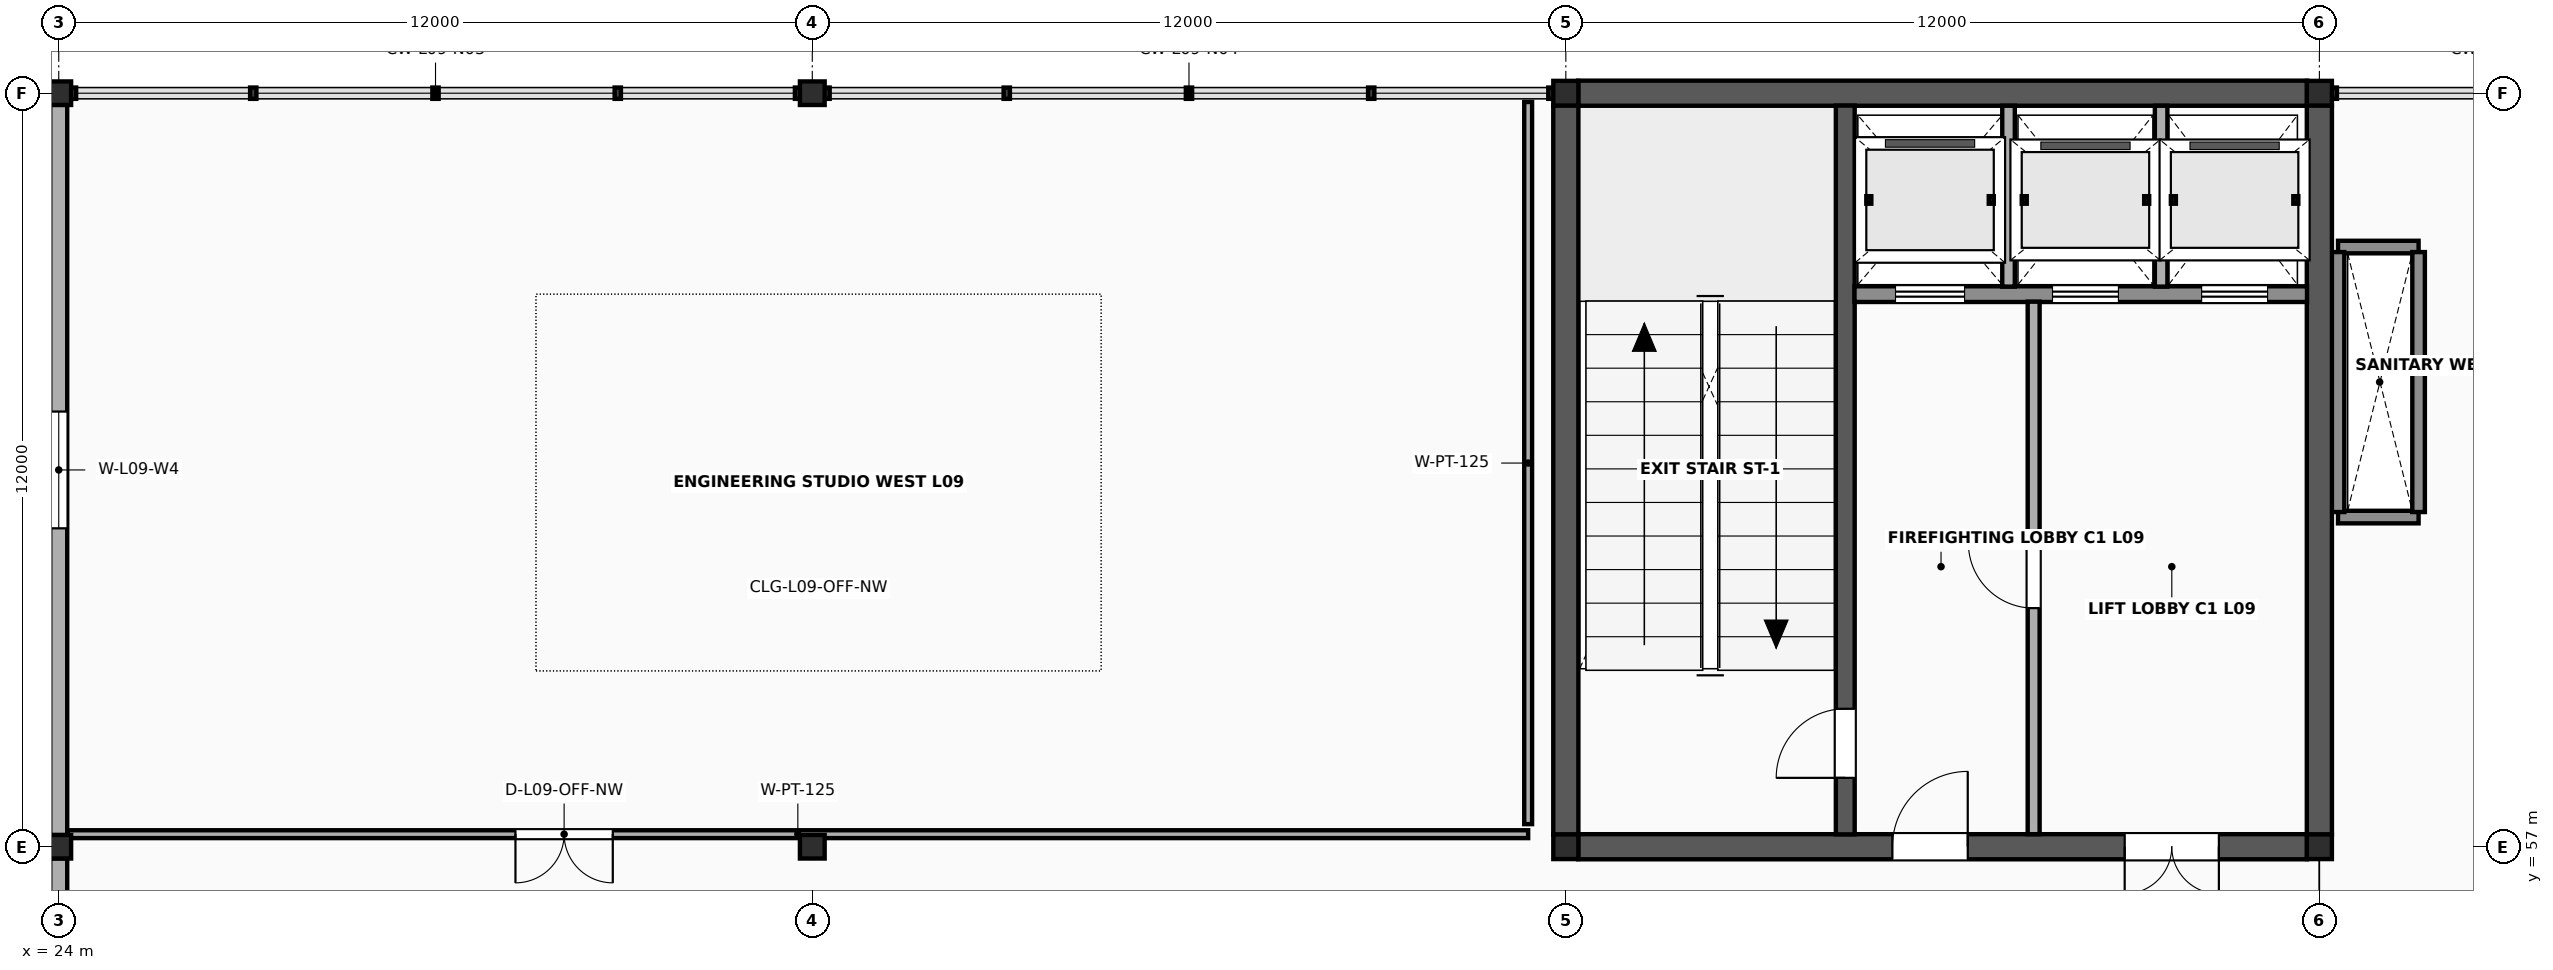
"""IFC4 building model, lengths in metres.
Left out: names, types, materials, properties, quantities, classifications, styles, units other than length and angle.
Written with IfcOpenShell. Run it as: python <this file> out.ifc"""

import sys

from ifc_helpers import new_model, si_unit, direction, frame, frame_2d, origin, origin_2d, place, context, subcontext, project, spatial, rectangle, i_section, extrude, element, fill, save


model = new_model("IFC4")
c1 = context("Model", 3, precision=1e-05, world=origin(), true_north=direction((0.0, 1.0)))
c2 = subcontext(c1, "Body", "Model", "MODEL_VIEW")
j1 = project(units=[si_unit("LENGTHUNIT", "METRE"), si_unit("PLANEANGLEUNIT", "RADIAN")], contexts=[c1])
p1 = place(None, origin())
s1 = spatial("IfcSite", under=j1, at=p1, CompositionType="ELEMENT")
p2 = place(p1, origin())
s2 = spatial("IfcBuilding", under=s1, at=p2, CompositionType="ELEMENT")
p3 = place(p2, frame((0.0, 0.0, 37.6)))
s3 = spatial("IfcBuildingStorey", under=s2, at=p3, CompositionType="ELEMENT", Elevation=37.6)
for number, where, z_axis, x_axis in (
    (1, (24.0, 57.0, 0.0), (0.0, 0.0, 1.0), (1.0, 0.0, 0.0)),
    (2, (24.0, 69.0, 0.0), (0.0, 0.0, 1.0), (1.0, 0.0, 0.0)),
    (3, (36.0, 57.0, 0.0), (0.0, 0.0, 1.0), (1.0, 0.0, 0.0)),
    (4, (36.0, 69.0, 0.0), (0.0, 0.0, 1.0), (1.0, 0.0, 0.0)),
):
    element("IfcColumn", number, at=place(p3, frame(where, z_axis=z_axis, x_axis=x_axis)), inside=s3, PredefinedType="COLUMN", context=c2, shape_type="SweptSolid", body=[
        extrude(i_section(OverallWidth=0.394, OverallDepth=0.375, WebThickness=0.017, FlangeThickness=0.028, FilletRadius=0.018, at=origin_2d()), origin(), (0.0, 0.0, 1.0), 4.0),
    ])
for number, where, z_axis, x_axis in (
    (5, (48.0, 57.0, 0.0), (0.0, 0.0, 1.0), (1.0, 0.0, 0.0)),
    (6, (48.0, 69.0, 0.0), (0.0, 0.0, 1.0), (1.0, 0.0, 0.0)),
    (7, (60.0, 57.0, 0.0), (0.0, 0.0, 1.0), (1.0, 0.0, 0.0)),
    (8, (60.0, 69.0, 0.0), (0.0, 0.0, 1.0), (1.0, 0.0, 0.0)),
):
    element("IfcColumn", number, at=place(p3, frame(where, z_axis=z_axis, x_axis=x_axis)), inside=s3, PredefinedType="COLUMN", context=c2, shape_type="SweptSolid", body=[
        extrude(i_section(OverallWidth=0.399, OverallDepth=0.393, WebThickness=0.023, FlangeThickness=0.037, FilletRadius=0.018, at=origin_2d()), origin(), (0.0, 0.0, 1.0), 4.0),
    ])
for number, where, z_axis, x_axis in (
    (9, (60.297, 62.25, 0.0), (0.0, 0.0, 1.0), (1.0, 0.0, 0.0)),
    (10, (60.297, 66.55, 0.0), (0.0, 0.0, 1.0), (1.0, 0.0, 0.0)),
):
    element("IfcWall", number, at=place(p3, frame(where, z_axis=z_axis, x_axis=x_axis)), inside=s3, PredefinedType="SOLIDWALL", context=c2, shape_type="SweptSolid", body=[
        extrude(rectangle(XDim=1.283, YDim=0.2, at=frame_2d((0.642, 0.0))), origin(), (0.0, 0.0, 1.0), 3.838),
    ])
for number, where, z_axis, x_axis in (
    (11, (60.297, 62.33, 0.0), (0.0, 0.0, 1.0), (0.0, 1.0, 0.0)),
    (12, (61.58, 62.33, 0.0), (0.0, 0.0, 1.0), (0.0, 1.0, 0.0)),
):
    element("IfcWall", number, at=place(p3, frame(where, z_axis=z_axis, x_axis=x_axis)), inside=s3, PredefinedType="SOLIDWALL", context=c2, shape_type="SweptSolid", body=[
        extrude(rectangle(XDim=4.14, YDim=0.2, at=frame_2d((2.07, 0.0))), origin(), (0.0, 0.0, 1.0), 3.838),
    ])
p4 = place(p3, frame((48.197, 57.0, 0.0), z_axis=(0.0, 0.0, 1.0), x_axis=(1.0, 0.0, 0.0)))
e13 = element("IfcWall", 13, at=p4, inside=s3, PredefinedType="SHEAR", context=c2, shape_type="SweptSolid", body=[
    extrude(rectangle(XDim=11.607, YDim=0.4, at=frame_2d((5.803, 0.0))), origin(), (0.0, 0.0, 1.0), 3.838),
])
p5 = place(p4, frame((5.004, 0.0, 0.0)))
e14 = element("IfcOpeningElement", 14, at=p5, cuts=e13, PredefinedType="OPENING", context=c2, shape_type="SweptSolid", body=[
    extrude(rectangle(XDim=1.2, YDim=2.2, at=frame_2d((0.6, 1.1))), frame((0.0, 0.215, 0.0), z_axis=(0.0, -1.0, 0.0), x_axis=(1.0, 0.0, 0.0)), (0.0, 0.0, 1.0), 0.43),
])
p6 = place(p4, frame((8.703, 0.0, 0.0)))
e15 = element("IfcOpeningElement", 15, at=p6, cuts=e13, PredefinedType="OPENING", context=c2, shape_type="SweptSolid", body=[
    extrude(rectangle(XDim=1.5, YDim=2.25, at=frame_2d((0.75, 1.125))), frame((0.0, 0.215, 0.0), z_axis=(0.0, -1.0, 0.0), x_axis=(1.0, 0.0, 0.0)), (0.0, 0.0, 1.0), 0.43),
])
p7 = place(p3, frame((48.197, 69.0, 0.0), z_axis=(0.0, 0.0, 1.0), x_axis=(1.0, 0.0, 0.0)))
e16 = element("IfcWall", 16, at=p7, inside=s3, PredefinedType="SHEAR", context=c2, shape_type="SweptSolid", body=[
    extrude(rectangle(XDim=11.607, YDim=0.4, at=frame_2d((5.803, 0.0))), origin(), (0.0, 0.0, 1.0), 3.838),
])
for number, where, z_axis, x_axis in (
    (17, (48.0, 57.194, 0.0), (0.0, 0.0, 1.0), (0.0, 1.0, 0.0)),
    (18, (60.0, 57.194, 0.0), (0.0, 0.0, 1.0), (0.0, 1.0, 0.0)),
):
    element("IfcWall", number, at=place(p3, frame(where, z_axis=z_axis, x_axis=x_axis)), inside=s3, PredefinedType="SHEAR", context=c2, shape_type="SweptSolid", body=[
        extrude(rectangle(XDim=11.613, YDim=0.4, at=frame_2d((5.806, 0.0))), origin(), (0.0, 0.0, 1.0), 3.838),
    ])
p8 = place(p3, frame((52.45, 57.197, 0.0), z_axis=(0.0, 0.0, 1.0), x_axis=(0.0, 1.0, 0.0)))
e19 = element("IfcWall", 19, at=p8, inside=s3, PredefinedType="SHEAR", context=c2, shape_type="SweptSolid", body=[
    extrude(rectangle(XDim=11.606, YDim=0.3, at=frame_2d((5.803, 0.0))), origin(), (0.0, 0.0, 1.0), 3.838),
])
p9 = place(p8, frame((0.9, 0.0, 0.0)))
e20 = element("IfcOpeningElement", 20, at=p9, cuts=e19, PredefinedType="OPENING", context=c2, shape_type="SweptSolid", body=[
    extrude(rectangle(XDim=1.1, YDim=2.2, at=frame_2d((0.55, 1.1))), frame((0.0, 0.165, 0.0), z_axis=(0.0, -1.0, 0.0), x_axis=(1.0, 0.0, 0.0)), (0.0, 0.0, 1.0), 0.33),
])
p10 = place(p3, frame((52.597, 65.8, 0.0), z_axis=(0.0, 0.0, 1.0), x_axis=(1.0, 0.0, 0.0)))
e21 = element("IfcWall", 21, at=p10, inside=s3, PredefinedType="SOLIDWALL", context=c2, shape_type="SweptSolid", body=[
    extrude(rectangle(XDim=7.206, YDim=0.25, at=frame_2d((3.603, 0.0))), origin(), (0.0, 0.0, 1.0), 3.838),
])
p11 = place(p10, frame((0.653, 0.0, 0.0)))
e22 = element("IfcOpeningElement", 22, at=p11, cuts=e21, PredefinedType="OPENING", context=c2, shape_type="SweptSolid", body=[
    extrude(rectangle(XDim=1.1, YDim=2.24, at=frame_2d((0.55, 1.12))), frame((0.0, 0.14, 0.0), z_axis=(0.0, -1.0, 0.0), x_axis=(1.0, 0.0, 0.0)), (0.0, 0.0, 1.0), 0.28),
])
p12 = place(p10, frame((3.153, 0.0, 0.0)))
e23 = element("IfcOpeningElement", 23, at=p12, cuts=e21, PredefinedType="OPENING", context=c2, shape_type="SweptSolid", body=[
    extrude(rectangle(XDim=1.05, YDim=2.2, at=frame_2d((0.525, 1.1))), frame((0.0, 0.14, 0.0), z_axis=(0.0, -1.0, 0.0), x_axis=(1.0, 0.0, 0.0)), (0.0, 0.0, 1.0), 0.28),
])
p13 = place(p10, frame((5.528, 0.0, 0.0)))
e24 = element("IfcOpeningElement", 24, at=p13, cuts=e21, PredefinedType="OPENING", context=c2, shape_type="SweptSolid", body=[
    extrude(rectangle(XDim=1.05, YDim=2.2, at=frame_2d((0.525, 1.1))), frame((0.0, 0.14, 0.0), z_axis=(0.0, -1.0, 0.0), x_axis=(1.0, 0.0, 0.0)), (0.0, 0.0, 1.0), 0.28),
])
for number, where, z_axis, x_axis in (
    (25, (55.05, 65.92, 0.0), (0.0, 0.0, 1.0), (0.0, 1.0, 0.0)),
    (26, (57.48, 65.92, 0.0), (0.0, 0.0, 1.0), (0.0, 1.0, 0.0)),
):
    element("IfcWall", number, at=place(p3, frame(where, z_axis=z_axis, x_axis=x_axis)), inside=s3, PredefinedType="SOLIDWALL", context=c2, shape_type="SweptSolid", body=[
        extrude(rectangle(XDim=2.88, YDim=0.2, at=frame_2d((1.44, 0.0))), origin(), (0.0, 0.0, 1.0), 3.828),
    ])
p14 = place(p3, frame((55.45, 57.2, 0.0), z_axis=(0.0, 0.0, 1.0), x_axis=(0.0, 1.0, 0.0)))
e27 = element("IfcWall", 27, at=p14, inside=s3, PredefinedType="SOLIDWALL", context=c2, shape_type="SweptSolid", body=[
    extrude(rectangle(XDim=8.48, YDim=0.19, at=frame_2d((4.24, 0.0))), origin(), (0.0, 0.0, 1.0), 3.828),
])
p15 = place(p14, frame((3.6, 0.0, 0.0)))
e28 = element("IfcOpeningElement", 28, at=p15, cuts=e27, PredefinedType="OPENING", context=c2, shape_type="SweptSolid", body=[
    extrude(rectangle(XDim=1.04, YDim=2.18, at=frame_2d((0.52, 1.09))), frame((0.0, 0.11, 0.0), z_axis=(0.0, -1.0, 0.0), x_axis=(1.0, 0.0, 0.0)), (0.0, 0.0, 1.0), 0.22),
])
p16 = place(p3, frame((24.0, 45.186, 0.0), z_axis=(0.0, 0.0, 1.0), x_axis=(0.0, 1.0, 0.0)))
e29 = element("IfcWall", 29, at=p16, inside=s3, PredefinedType="SOLIDWALL", context=c2, shape_type="SweptSolid", body=[
    extrude(rectangle(XDim=11.629, YDim=0.27, at=frame_2d((5.814, 0.0))), origin(), (0.0, 0.0, 1.0), 3.291),
])
p17 = place(p16, frame((4.994, 0.0, 0.78)))
e30 = element("IfcOpeningElement", 30, at=p17, cuts=e29, PredefinedType="OPENING", context=c2, shape_type="SweptSolid", body=[
    extrude(rectangle(XDim=1.64, YDim=1.74, at=frame_2d((0.82, 0.87))), frame((0.0, 0.15, 0.0), z_axis=(0.0, -1.0, 0.0), x_axis=(1.0, 0.0, 0.0)), (0.0, 0.0, 1.0), 0.3),
])
p18 = place(p3, frame((24.0, 57.186, 0.0), z_axis=(0.0, 0.0, 1.0), x_axis=(0.0, 1.0, 0.0)))
e31 = element("IfcWall", 31, at=p18, inside=s3, PredefinedType="SOLIDWALL", context=c2, shape_type="SweptSolid", body=[
    extrude(rectangle(XDim=11.629, YDim=0.27, at=frame_2d((5.814, 0.0))), origin(), (0.0, 0.0, 1.0), 3.291),
])
p19 = place(p18, frame((4.885, 0.0, 0.78)))
e32 = element("IfcOpeningElement", 32, at=p19, cuts=e31, PredefinedType="OPENING", context=c2, shape_type="SweptSolid", body=[
    extrude(rectangle(XDim=1.86, YDim=1.74, at=frame_2d((0.93, 0.87))), frame((0.0, 0.15, 0.0), z_axis=(0.0, -1.0, 0.0), x_axis=(1.0, 0.0, 0.0)), (0.0, 0.0, 1.0), 0.3),
])
p20 = place(p3, frame((24.14, 57.2, 0.0), z_axis=(0.0, 0.0, 1.0), x_axis=(1.0, 0.0, 0.0)))
e33 = element("IfcWall", 33, at=p20, inside=s3, PredefinedType="PARTITIONING", context=c2, shape_type="SweptSolid", body=[
    extrude(rectangle(XDim=23.26, YDim=0.125, at=frame_2d((11.63, 0.0))), origin(), (0.0, 0.0, 1.0), 2.88),
])
p21 = place(p20, frame((7.133, 0.0, 0.0)))
e34 = element("IfcOpeningElement", 34, at=p21, cuts=e33, PredefinedType="OPENING", context=c2, shape_type="SweptSolid", body=[
    extrude(rectangle(XDim=1.55, YDim=2.31, at=frame_2d((0.775, 1.155))), frame((0.0, 0.077, 0.0), z_axis=(0.0, -1.0, 0.0), x_axis=(1.0, 0.0, 0.0)), (0.0, 0.0, 1.0), 0.155),
])
p22 = place(p3, frame((47.4, 57.36, 0.0), z_axis=(0.0, 0.0, 1.0), x_axis=(0.0, 1.0, 0.0)))
e35 = element("IfcWall", 35, at=p22, inside=s3, PredefinedType="PARTITIONING", context=c2, shape_type="SweptSolid", body=[
    extrude(rectangle(XDim=11.5, YDim=0.125, at=frame_2d((5.75, 0.0))), origin(), (0.0, 0.0, 1.0), 2.88),
])
p23 = place(p19, origin())
e36 = element("IfcWindow", 36, at=p23, inside=s3, PartitioningType="DOUBLE_PANEL_VERTICAL", PredefinedType="WINDOW", context=c2, shape_type="SweptSolid", body=[
    extrude(rectangle(XDim=1.86, YDim=1.74, at=frame_2d((0.93, 0.87))), frame((0.0, 0.03, 0.0), z_axis=(0.0, -1.0, 0.0), x_axis=(1.0, 0.0, 0.0)), (0.0, 0.0, 1.0), 0.06),
])
fill(e32, e36)
p24 = place(p9, origin())
e37 = element("IfcDoor", 37, at=p24, inside=s3, OperationType="SINGLE_SWING_LEFT", PredefinedType="DOOR", context=c2, shape_type="SweptSolid", body=[
    extrude(rectangle(XDim=1.1, YDim=2.2, at=frame_2d((0.55, 1.1))), frame((0.0, 0.025, 0.0), z_axis=(0.0, -1.0, 0.0), x_axis=(1.0, 0.0, 0.0)), (0.0, 0.0, 1.0), 0.05),
])
fill(e20, e37)
p25 = place(p15, origin())
e38 = element("IfcDoor", 38, at=p25, inside=s3, OperationType="SINGLE_SWING_RIGHT", PredefinedType="DOOR", context=c2, shape_type="SweptSolid", body=[
    extrude(rectangle(XDim=1.04, YDim=2.18, at=frame_2d((0.52, 1.09))), frame((0.0, 0.025, 0.0), z_axis=(0.0, -1.0, 0.0), x_axis=(1.0, 0.0, 0.0)), (0.0, 0.0, 1.0), 0.05),
])
fill(e28, e38)
p26 = place(p5, origin())
e39 = element("IfcDoor", 39, at=p26, inside=s3, OperationType="SINGLE_SWING_RIGHT", PredefinedType="DOOR", context=c2, shape_type="SweptSolid", body=[
    extrude(rectangle(XDim=1.2, YDim=2.2, at=frame_2d((0.6, 1.1))), frame((0.0, 0.025, 0.0), z_axis=(0.0, -1.0, 0.0), x_axis=(1.0, 0.0, 0.0)), (0.0, 0.0, 1.0), 0.05),
])
fill(e14, e39)
p27 = place(p6, origin())
e40 = element("IfcDoor", 40, at=p27, inside=s3, OperationType="DOUBLE_DOOR_SINGLE_SWING", PredefinedType="DOOR", context=c2, shape_type="SweptSolid", body=[
    extrude(rectangle(XDim=1.5, YDim=2.25, at=frame_2d((0.75, 1.125))), frame((0.0, 0.025, 0.0), z_axis=(0.0, -1.0, 0.0), x_axis=(1.0, 0.0, 0.0)), (0.0, 0.0, 1.0), 0.05),
])
fill(e15, e40)
p28 = place(p11, origin())
e41 = element("IfcDoor", 41, at=p28, inside=s3, OperationType="SLIDING_TO_LEFT", PredefinedType="USERDEFINED", context=c2, shape_type="SweptSolid", body=[
    extrude(rectangle(XDim=1.1, YDim=2.24, at=frame_2d((0.55, 1.12))), frame((0.0, 0.025, 0.0), z_axis=(0.0, -1.0, 0.0), x_axis=(1.0, 0.0, 0.0)), (0.0, 0.0, 1.0), 0.05),
])
fill(e22, e41)
p29 = place(p12, origin())
e42 = element("IfcDoor", 42, at=p29, inside=s3, OperationType="SLIDING_TO_LEFT", PredefinedType="USERDEFINED", context=c2, shape_type="SweptSolid", body=[
    extrude(rectangle(XDim=1.05, YDim=2.2, at=frame_2d((0.525, 1.1))), frame((0.0, 0.025, 0.0), z_axis=(0.0, -1.0, 0.0), x_axis=(1.0, 0.0, 0.0)), (0.0, 0.0, 1.0), 0.05),
])
fill(e23, e42)
p30 = place(p13, origin())
e43 = element("IfcDoor", 43, at=p30, inside=s3, OperationType="SLIDING_TO_LEFT", PredefinedType="USERDEFINED", context=c2, shape_type="SweptSolid", body=[
    extrude(rectangle(XDim=1.05, YDim=2.2, at=frame_2d((0.525, 1.1))), frame((0.0, 0.025, 0.0), z_axis=(0.0, -1.0, 0.0), x_axis=(1.0, 0.0, 0.0)), (0.0, 0.0, 1.0), 0.05),
])
fill(e24, e43)
p31 = place(p21, origin())
e44 = element("IfcDoor", 44, at=p31, inside=s3, OperationType="DOUBLE_DOOR_SINGLE_SWING", PredefinedType="DOOR", context=c2, shape_type="SweptSolid", body=[
    extrude(rectangle(XDim=1.55, YDim=2.31, at=frame_2d((0.775, 1.155))), frame((0.0, 0.025, 0.0), z_axis=(0.0, -1.0, 0.0), x_axis=(1.0, 0.0, 0.0)), (0.0, 0.0, 1.0), 0.05),
])
fill(e34, e44)
save(model, sys.argv[1])
